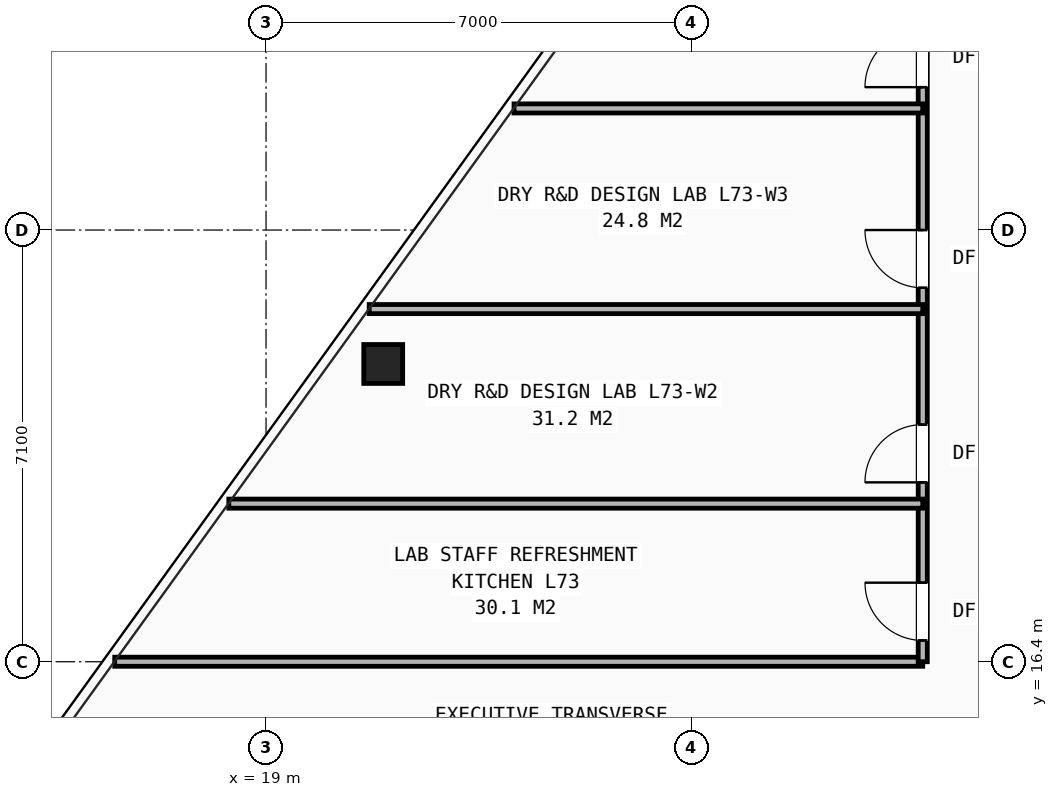
"""IFC4 building model, lengths in metres.
Left out: names, types, materials, properties, quantities, classifications, styles, units other than length and angle.
Written with IfcOpenShell. Run it as: python <this file> out.ifc"""

import sys

from ifc_helpers import new_model, si_unit, direction, frame, frame_2d, origin, origin_2d, place, context, subcontext, project, spatial, rectangle, hollow_rectangle, extrude, element, fill, save


model = new_model("IFC4")
c1 = context("Model", 3, precision=1e-05, world=origin(), true_north=direction((0.0, 1.0)))
c2 = subcontext(c1, "Body", "Model", "MODEL_VIEW")
j1 = project(units=[si_unit("LENGTHUNIT", "METRE"), si_unit("PLANEANGLEUNIT", "RADIAN")], contexts=[c1])
p1 = place(None, origin())
s1 = spatial("IfcSite", under=j1, at=p1, CompositionType="ELEMENT")
p2 = place(p1, origin())
s2 = spatial("IfcBuilding", under=s1, at=p2, CompositionType="ELEMENT")
p3 = place(p2, frame((0.0, 0.0, 258.5)))
s3 = spatial("IfcBuildingStorey", under=s2, at=p3, CompositionType="ELEMENT", Elevation=258.5)
p4 = place(p3, frame((20.927, 21.297, 0.0), z_axis=(0.0, 0.0, 1.0), x_axis=(1.0, 0.0, 0.0)))
e1 = element("IfcColumn", 1, at=p4, inside=s3, PredefinedType="COLUMN", context=c2, shape_type="SweptSolid", body=[
    extrude(hollow_rectangle(XDim=0.64, YDim=0.64, WallThickness=0.045, at=origin_2d()), origin(), (0.0, 0.0, 1.0), 3.5),
])
p5 = place(p3, frame((16.511, 16.4, 0.0), z_axis=(0.0, 0.0, 1.0), x_axis=(1.0, 0.0, 0.0)))
e2 = element("IfcWall", 2, at=p5, inside=s3, PredefinedType="PARTITIONING", context=c2, shape_type="SweptSolid", body=[
    extrude(rectangle(XDim=13.289, YDim=0.15, at=frame_2d((6.644, 0.0))), origin(), (0.0, 0.0, 1.0), 2.292),
])
p6 = place(p3, frame((29.8, 16.4, 0.0), z_axis=(0.0, 0.0, 1.0), x_axis=(0.0, 1.0, 0.0)))
e3 = element("IfcWall", 3, at=p6, inside=s3, PredefinedType="PARTITIONING", context=c2, shape_type="SweptSolid", body=[
    extrude(rectangle(XDim=19.3, YDim=0.15, at=frame_2d((9.65, 0.0))), origin(), (0.0, 0.0, 1.0), 2.292),
])
p7 = place(p6, frame((0.35, 0.0, 0.0)))
e4 = element("IfcOpeningElement", 4, at=p7, cuts=e3, PredefinedType="OPENING", context=c2, shape_type="SweptSolid", body=[
    extrude(rectangle(XDim=0.95, YDim=2.1, at=frame_2d((0.475, 1.05))), frame((0.0, 0.085, 0.0), z_axis=(0.0, -1.0, 0.0), x_axis=(1.0, 0.0, 0.0)), (0.0, 0.0, 1.0), 0.17),
])
p8 = place(p6, frame((2.95, 0.0, 0.0)))
e5 = element("IfcOpeningElement", 5, at=p8, cuts=e3, PredefinedType="OPENING", context=c2, shape_type="SweptSolid", body=[
    extrude(rectangle(XDim=0.95, YDim=2.1, at=frame_2d((0.475, 1.05))), frame((0.0, 0.085, 0.0), z_axis=(0.0, -1.0, 0.0), x_axis=(1.0, 0.0, 0.0)), (0.0, 0.0, 1.0), 0.17),
])
p9 = place(p6, frame((6.15, 0.0, 0.0)))
e6 = element("IfcOpeningElement", 6, at=p9, cuts=e3, PredefinedType="OPENING", context=c2, shape_type="SweptSolid", body=[
    extrude(rectangle(XDim=0.95, YDim=2.1, at=frame_2d((0.475, 1.05))), frame((0.0, 0.085, 0.0), z_axis=(0.0, -1.0, 0.0), x_axis=(1.0, 0.0, 0.0)), (0.0, 0.0, 1.0), 0.17),
])
p10 = place(p6, frame((9.45, 0.0, 0.0)))
e7 = element("IfcOpeningElement", 7, at=p10, cuts=e3, PredefinedType="OPENING", context=c2, shape_type="SweptSolid", body=[
    extrude(rectangle(XDim=0.95, YDim=2.1, at=frame_2d((0.475, 1.05))), frame((0.0, 0.085, 0.0), z_axis=(0.0, -1.0, 0.0), x_axis=(1.0, 0.0, 0.0)), (0.0, 0.0, 1.0), 0.17),
])
p11 = place(p6, frame((12.95, 0.0, 0.0)))
e8 = element("IfcOpeningElement", 8, at=p11, cuts=e3, PredefinedType="OPENING", context=c2, shape_type="SweptSolid", body=[
    extrude(rectangle(XDim=0.95, YDim=2.1, at=frame_2d((0.475, 1.05))), frame((0.0, 0.085, 0.0), z_axis=(0.0, -1.0, 0.0), x_axis=(1.0, 0.0, 0.0)), (0.0, 0.0, 1.0), 0.17),
])
p12 = place(p3, frame((18.388, 19.0, 0.0), z_axis=(0.0, 0.0, 1.0), x_axis=(1.0, 0.0, 0.0)))
e9 = element("IfcWall", 9, at=p12, inside=s3, PredefinedType="PARTITIONING", context=c2, shape_type="SweptSolid", body=[
    extrude(rectangle(XDim=11.412, YDim=0.15, at=frame_2d((5.706, 0.0))), origin(), (0.0, 0.0, 1.0), 2.292),
])
p13 = place(p3, frame((20.697, 22.2, 0.0), z_axis=(0.0, 0.0, 1.0), x_axis=(1.0, 0.0, 0.0)))
e10 = element("IfcWall", 10, at=p13, inside=s3, PredefinedType="PARTITIONING", context=c2, shape_type="SweptSolid", body=[
    extrude(rectangle(XDim=9.103, YDim=0.15, at=frame_2d((4.552, 0.0))), origin(), (0.0, 0.0, 1.0), 2.628),
])
p14 = place(p3, frame((23.078, 25.5, 0.0), z_axis=(0.0, 0.0, 1.0), x_axis=(1.0, 0.0, 0.0)))
e11 = element("IfcWall", 11, at=p14, inside=s3, PredefinedType="PARTITIONING", context=c2, shape_type="SweptSolid", body=[
    extrude(rectangle(XDim=6.722, YDim=0.15, at=frame_2d((3.361, 0.0))), origin(), (0.0, 0.0, 1.0), 2.628),
])
p15 = place(p7, origin())
e12 = element("IfcDoor", 12, at=p15, inside=s3, OperationType="SINGLE_SWING_RIGHT", PredefinedType="DOOR", context=c2, shape_type="SweptSolid", body=[
    extrude(rectangle(XDim=0.95, YDim=2.1, at=frame_2d((0.475, 1.05))), frame((0.0, 0.025, 0.0), z_axis=(0.0, -1.0, 0.0), x_axis=(1.0, 0.0, 0.0)), (0.0, 0.0, 1.0), 0.05),
])
fill(e4, e12)
p16 = place(p8, origin())
e13 = element("IfcDoor", 13, at=p16, inside=s3, OperationType="SINGLE_SWING_LEFT", PredefinedType="DOOR", context=c2, shape_type="SweptSolid", body=[
    extrude(rectangle(XDim=0.95, YDim=2.1, at=frame_2d((0.475, 1.05))), frame((0.0, 0.025, 0.0), z_axis=(0.0, -1.0, 0.0), x_axis=(1.0, 0.0, 0.0)), (0.0, 0.0, 1.0), 0.05),
])
fill(e5, e13)
p17 = place(p9, origin())
e14 = element("IfcDoor", 14, at=p17, inside=s3, OperationType="SINGLE_SWING_RIGHT", PredefinedType="DOOR", context=c2, shape_type="SweptSolid", body=[
    extrude(rectangle(XDim=0.95, YDim=2.1, at=frame_2d((0.475, 1.05))), frame((0.0, 0.025, 0.0), z_axis=(0.0, -1.0, 0.0), x_axis=(1.0, 0.0, 0.0)), (0.0, 0.0, 1.0), 0.05),
])
fill(e6, e14)
p18 = place(p10, origin())
e15 = element("IfcDoor", 15, at=p18, inside=s3, OperationType="SINGLE_SWING_LEFT", PredefinedType="DOOR", context=c2, shape_type="SweptSolid", body=[
    extrude(rectangle(XDim=0.95, YDim=2.1, at=frame_2d((0.475, 1.05))), frame((0.0, 0.025, 0.0), z_axis=(0.0, -1.0, 0.0), x_axis=(1.0, 0.0, 0.0)), (0.0, 0.0, 1.0), 0.05),
])
fill(e7, e15)
save(model, sys.argv[1])
